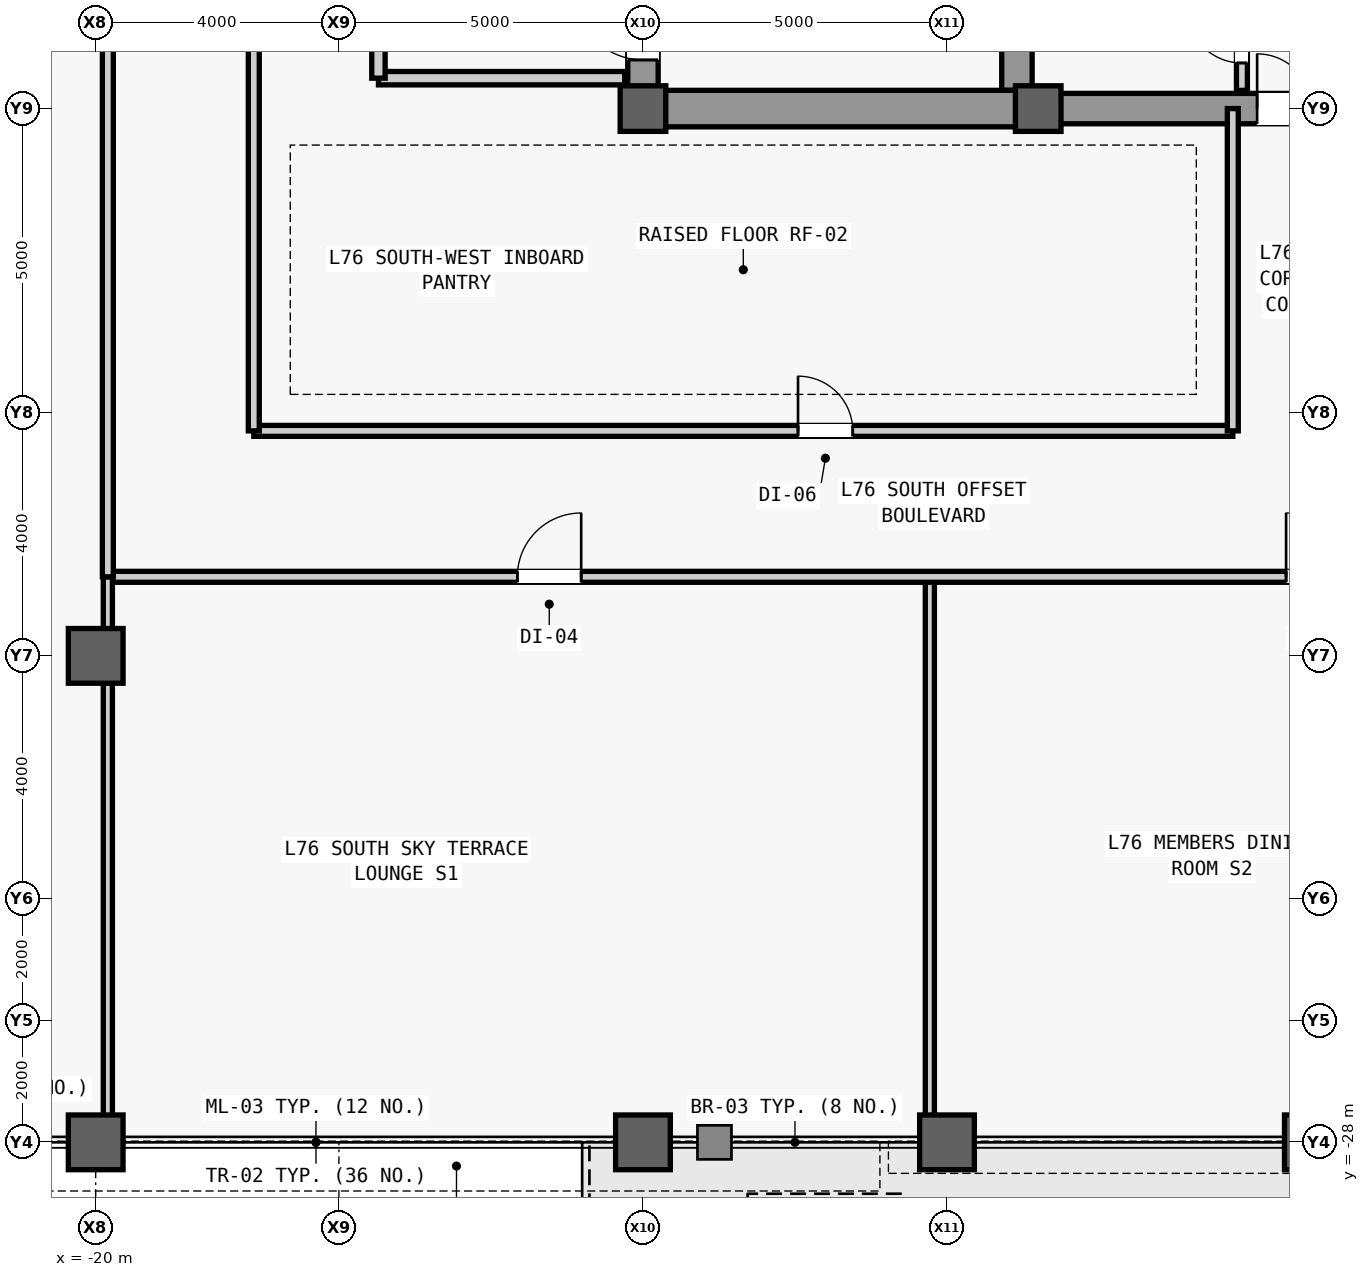
"""IFC4 building model, lengths in metres.
Left out: names, types, materials, properties, quantities, classifications, styles, units other than length and angle.
Written with IfcOpenShell. Run it as: python <this file> out.ifc"""

import sys

from ifc_helpers import new_model, si_unit, direction, frame, frame_2d, origin, origin_2d, place, context, subcontext, project, spatial, rectangle, hollow_rectangle, extrude, source, transform, mapped, element, fill, save


model = new_model("IFC4")
c1 = context("Model", 3, precision=1e-05, world=origin(), true_north=direction((0.0, 1.0)))
c2 = subcontext(c1, "Body", "Model", "MODEL_VIEW")
j1 = project(units=[si_unit("LENGTHUNIT", "METRE"), si_unit("PLANEANGLEUNIT", "RADIAN")], contexts=[c1])
p1 = place(None, origin())
s1 = spatial("IfcSite", under=j1, at=p1, CompositionType="ELEMENT")
p2 = place(p1, origin())
s2 = spatial("IfcBuilding", under=s1, at=p2, CompositionType="ELEMENT")
p3 = place(p2, frame((0.0, 0.0, 321.5)))
s3 = spatial("IfcBuildingStorey", under=s2, at=p3, CompositionType="ELEMENT", Elevation=321.5)
m1 = source(origin(), c2, "Body", "SweptSolid", [
    extrude(rectangle(XDim=22.0, YDim=0.5, at=frame_2d((11.0, 0.0))), origin(), (0.0, 0.0, 1.0), 4.54),
])
p4 = place(p3, frame((-11.0, -11.0, 0.0), z_axis=(0.0, 0.0, 1.0), x_axis=(0.0, 1.0, 0.0)))
e1 = element("IfcWall", 1, at=p4, inside=s3, PredefinedType="SHEAR", context=c2, shape_type="MappedRepresentation", body=[
    mapped(m1, transform((0.0, 0.0, 0.0), scale=1.0)),
])
m2 = source(origin(), c2, "Body", "SweptSolid", [
    extrude(rectangle(XDim=1.1, YDim=2.2, at=frame_2d((0.55, 1.1))), frame((0.0, 0.26, 0.0), z_axis=(0.0, -1.0, 0.0), x_axis=(1.0, 0.0, 0.0)), (0.0, 0.0, 1.0), 0.52),
])
p5 = place(p4, frame((0.8, 0.0, 0.0)))
e2 = element("IfcOpeningElement", 2, at=p5, cuts=e1, PredefinedType="OPENING", context=c2, shape_type="MappedRepresentation", body=[
    mapped(m2, transform((0.0, 0.0, 0.0), scale=1.0)),
])
p6 = place(p4, frame((12.5, 0.0, 0.0)))
e3 = element("IfcOpeningElement", 3, at=p6, cuts=e1, PredefinedType="OPENING", context=c2, shape_type="MappedRepresentation", body=[
    mapped(m2, transform((0.0, 0.0, 0.0), scale=1.0)),
])
m3 = source(origin(), c2, "Body", "SweptSolid", [
    extrude(rectangle(XDim=0.9, YDim=2.15, at=frame_2d((0.45, 1.075))), frame((0.0, 0.26, 0.0), z_axis=(0.0, -1.0, 0.0), x_axis=(1.0, 0.0, 0.0)), (0.0, 0.0, 1.0), 0.52),
])
p7 = place(p4, frame((6.2, 0.0, 0.0)))
e4 = element("IfcOpeningElement", 4, at=p7, cuts=e1, PredefinedType="OPENING", context=c2, shape_type="MappedRepresentation", body=[
    mapped(m3, transform((0.0, 0.0, 0.0), scale=1.0)),
])
p8 = place(p4, frame((8.525, 0.0, 0.0)))
e5 = element("IfcOpeningElement", 5, at=p8, cuts=e1, PredefinedType="OPENING", context=c2, shape_type="MappedRepresentation", body=[
    mapped(m3, transform((0.0, 0.0, 0.0), scale=1.0)),
])
m4 = source(origin(), c2, "Body", "SweptSolid", [
    extrude(rectangle(XDim=1.2, YDim=2.3, at=frame_2d((0.6, 1.15))), frame((0.0, 0.26, 0.0), z_axis=(0.0, -1.0, 0.0), x_axis=(1.0, 0.0, 0.0)), (0.0, 0.0, 1.0), 0.52),
])
p9 = place(p4, frame((14.6, 0.0, 0.0)))
e6 = element("IfcOpeningElement", 6, at=p9, cuts=e1, PredefinedType="OPENING", context=c2, shape_type="MappedRepresentation", body=[
    mapped(m4, transform((0.0, 0.0, 0.0), scale=1.0)),
])
p10 = place(p4, frame((18.2, 0.0, 0.0)))
e7 = element("IfcOpeningElement", 7, at=p10, cuts=e1, PredefinedType="OPENING", context=c2, shape_type="MappedRepresentation", body=[
    mapped(m4, transform((0.0, 0.0, 0.0), scale=1.0)),
])
m5 = source(origin(), c2, "Body", "SweptSolid", [
    extrude(rectangle(XDim=1.3, YDim=2.3, at=frame_2d((0.65, 1.15))), frame((0.0, 0.26, 0.0), z_axis=(0.0, -1.0, 0.0), x_axis=(1.0, 0.0, 0.0)), (0.0, 0.0, 1.0), 0.52),
])
p11 = place(p4, frame((2.7, 0.0, 0.0)))
e8 = element("IfcOpeningElement", 8, at=p11, cuts=e1, PredefinedType="OPENING", context=c2, shape_type="MappedRepresentation", body=[
    mapped(m5, transform((0.0, 0.0, 0.0), scale=1.0)),
])
m6 = source(origin(), c2, "Body", "SweptSolid", [
    extrude(rectangle(XDim=21.4, YDim=0.5, at=frame_2d((10.7, 0.0))), origin(), (0.0, 0.0, 1.0), 4.54),
])
p12 = place(p3, frame((-4.85, -10.7, 0.0), z_axis=(0.0, 0.0, 1.0), x_axis=(0.0, 1.0, 0.0)))
e9 = element("IfcWall", 9, at=p12, inside=s3, PredefinedType="SHEAR", context=c2, shape_type="MappedRepresentation", body=[
    mapped(m6, transform((0.0, 0.0, 0.0), scale=1.0)),
])
m7 = source(origin(), c2, "Body", "SweptSolid", [
    extrude(rectangle(XDim=5.9, YDim=0.6, at=frame_2d((2.95, 0.0))), origin(), (0.0, 0.0, 1.0), 4.54),
])
p13 = place(p3, frame((-10.75, -11.0, 0.0), z_axis=(0.0, 0.0, 1.0), x_axis=(1.0, 0.0, 0.0)))
e10 = element("IfcWall", 10, at=p13, inside=s3, PredefinedType="SHEAR", context=c2, shape_type="MappedRepresentation", body=[
    mapped(m7, transform((0.0, 0.0, 0.0), scale=1.0)),
])
m8 = source(origin(), c2, "Body", "SweptSolid", [
    extrude(rectangle(XDim=9.2, YDim=0.5, at=frame_2d((4.6, 0.0))), origin(), (0.0, 0.0, 1.0), 4.54),
])
p14 = place(p3, frame((-4.6, -11.0, 0.0), z_axis=(0.0, 0.0, 1.0), x_axis=(1.0, 0.0, 0.0)))
e11 = element("IfcWall", 11, at=p14, inside=s3, PredefinedType="SHEAR", context=c2, shape_type="MappedRepresentation", body=[
    mapped(m8, transform((0.0, 0.0, 0.0), scale=1.0)),
])
m9 = source(origin(), c2, "Body", "SweptSolid", [
    extrude(rectangle(XDim=1.8, YDim=2.25, at=frame_2d((0.9, 1.125))), frame((0.0, 0.26, 0.0), z_axis=(0.0, -1.0, 0.0), x_axis=(1.0, 0.0, 0.0)), (0.0, 0.0, 1.0), 0.52),
])
p15 = place(p14, frame((3.7, 0.0, 0.0)))
e12 = element("IfcOpeningElement", 12, at=p15, cuts=e11, PredefinedType="OPENING", context=c2, shape_type="MappedRepresentation", body=[
    mapped(m9, transform((0.0, 0.0, 0.0), scale=1.0)),
])
m10 = source(origin(), c2, "Body", "SweptSolid", [
    extrude(hollow_rectangle(XDim=0.9, YDim=0.9, WallThickness=0.05, at=origin_2d()), origin(), (0.0, 0.0, 1.0), 4.8),
])
for number, where, z_axis, x_axis in (
    (13, (-20.0, -28.0, 0.0), (0.0, 0.0, 1.0), (1.0, 0.0, 0.0)),
    (14, (-20.0, -20.0, 0.0), (0.0, 0.0, 1.0), (1.0, 0.0, 0.0)),
    (15, (-11.0, -28.0, 0.0), (0.0, 0.0, 1.0), (1.0, 0.0, 0.0)),
):
    element("IfcColumn", number, at=place(p3, frame(where, z_axis=z_axis, x_axis=x_axis)), inside=s3, PredefinedType="COLUMN", context=c2, shape_type="MappedRepresentation", body=[
        mapped(m10, transform((0.0, 0.0, 0.0), scale=1.0)),
    ])
m11 = source(origin(), c2, "Body", "SweptSolid", [
    extrude(rectangle(XDim=0.75, YDim=0.75, at=origin_2d()), origin(), (0.0, 0.0, 1.0), 4.8),
])
p16 = place(p3, frame((-11.0, -11.0, 0.0), z_axis=(0.0, 0.0, 1.0), x_axis=(1.0, 0.0, 0.0)))
e16 = element("IfcColumn", 16, at=p16, inside=s3, PredefinedType="COLUMN", context=c2, shape_type="MappedRepresentation", body=[
    mapped(m11, transform((0.0, 0.0, 0.0), scale=1.0)),
])
p17 = place(p3, frame((-6.0, -28.0, 0.0), z_axis=(0.0, 0.0, 1.0), x_axis=(1.0, 0.0, 0.0)))
e17 = element("IfcColumn", 17, at=p17, inside=s3, PredefinedType="COLUMN", context=c2, shape_type="MappedRepresentation", body=[
    mapped(m10, transform((0.0, 0.0, 0.0), scale=1.0)),
])
p18 = place(p3, frame((-4.5, -11.0, 0.0), z_axis=(0.0, 0.0, 1.0), x_axis=(1.0, 0.0, 0.0)))
e18 = element("IfcColumn", 18, at=p18, inside=s3, PredefinedType="COLUMN", context=c2, shape_type="MappedRepresentation", body=[
    mapped(m11, transform((0.0, 0.0, 0.0), scale=1.0)),
])
p19 = place(p3, frame((0.0, -28.0, 0.0), z_axis=(0.0, 0.0, 1.0), x_axis=(1.0, 0.0, 0.0)))
e19 = element("IfcColumn", 19, at=p19, inside=s3, PredefinedType="COLUMN", context=c2, shape_type="MappedRepresentation", body=[
    mapped(m10, transform((0.0, 0.0, 0.0), scale=1.0)),
])
m12 = source(origin(), c2, "Body", "SweptSolid", [
    extrude(rectangle(XDim=4.05, YDim=0.22, at=frame_2d((2.025, 0.0))), origin(), (0.0, 0.0, 1.0), 4.54),
])
p20 = place(p3, frame((-15.35, -10.5, 0.0), z_axis=(0.0, 0.0, 1.0), x_axis=(1.0, 0.0, 0.0)))
e20 = element("IfcWall", 20, at=p20, inside=s3, PredefinedType="PARTITIONING", context=c2, shape_type="MappedRepresentation", body=[
    mapped(m12, transform((0.0, 0.0, 0.0), scale=1.0)),
])
m13 = source(origin(), c2, "Body", "SweptSolid", [
    extrude(rectangle(XDim=4.4, YDim=0.22, at=frame_2d((2.2, 0.0))), origin(), (0.0, 0.0, 1.0), 4.54),
])
p21 = place(p3, frame((-15.35, -10.5, 0.0), z_axis=(0.0, 0.0, 1.0), x_axis=(0.0, 1.0, 0.0)))
e21 = element("IfcWall", 21, at=p21, inside=s3, PredefinedType="PARTITIONING", context=c2, shape_type="MappedRepresentation", body=[
    mapped(m13, transform((0.0, 0.0, 0.0), scale=1.0)),
])
m14 = source(origin(), c2, "Body", "SweptSolid", [
    extrude(rectangle(XDim=1.2, YDim=2.2, at=frame_2d((0.6, 1.1))), frame((0.0, 0.12, 0.0), z_axis=(0.0, -1.0, 0.0), x_axis=(1.0, 0.0, 0.0)), (0.0, 0.0, 1.0), 0.24),
])
p22 = place(p21, frame((1.6, 0.0, 0.0)))
e22 = element("IfcOpeningElement", 22, at=p22, cuts=e21, PredefinedType="OPENING", context=c2, shape_type="MappedRepresentation", body=[
    mapped(m14, transform((0.0, 0.0, 0.0), scale=1.0)),
])
m15 = source(origin(), c2, "Body", "SweptSolid", [
    extrude(rectangle(XDim=5.4, YDim=0.18, at=frame_2d((2.7, 0.0))), origin(), (0.0, 0.0, 1.0), 4.54),
])
p23 = place(p3, frame((-1.15, -10.7, 0.0), z_axis=(0.0, 0.0, 1.0), x_axis=(0.0, 1.0, 0.0)))
e23 = element("IfcWall", 23, at=p23, inside=s3, PredefinedType="PARTITIONING", context=c2, shape_type="MappedRepresentation", body=[
    mapped(m15, transform((0.0, 0.0, 0.0), scale=1.0)),
])
m16 = source(origin(), c2, "Body", "SweptSolid", [
    extrude(rectangle(XDim=0.9, YDim=2.15, at=frame_2d((0.45, 1.075))), frame((0.0, 0.1, 0.0), z_axis=(0.0, -1.0, 0.0), x_axis=(1.0, 0.0, 0.0)), (0.0, 0.0, 1.0), 0.2),
])
p24 = place(p23, frame((0.45, 0.0, 0.0)))
e24 = element("IfcOpeningElement", 24, at=p24, cuts=e23, PredefinedType="OPENING", context=c2, shape_type="MappedRepresentation", body=[
    mapped(m16, transform((0.0, 0.0, 0.0), scale=1.0)),
])
p25 = place(p23, frame((2.25, 0.0, 0.0)))
e25 = element("IfcOpeningElement", 25, at=p25, cuts=e23, PredefinedType="OPENING", context=c2, shape_type="MappedRepresentation", body=[
    mapped(m16, transform((0.0, 0.0, 0.0), scale=1.0)),
])
p26 = place(p23, frame((4.05, 0.0, 0.0)))
e26 = element("IfcOpeningElement", 26, at=p26, cuts=e23, PredefinedType="OPENING", context=c2, shape_type="MappedRepresentation", body=[
    mapped(m16, transform((0.0, 0.0, 0.0), scale=1.0)),
])
m17 = source(origin(), c2, "Body", "SweptSolid", [
    extrude(rectangle(XDim=16.1, YDim=0.18, at=frame_2d((8.05, 0.0))), origin(), (0.0, 0.0, 1.0), 4.54),
])
p27 = place(p3, frame((-17.4, -16.3, 0.0), z_axis=(0.0, 0.0, 1.0), x_axis=(1.0, 0.0, 0.0)))
e27 = element("IfcWall", 27, at=p27, inside=s3, PredefinedType="PARTITIONING", context=c2, shape_type="MappedRepresentation", body=[
    mapped(m17, transform((0.0, 0.0, 0.0), scale=1.0)),
])
p28 = place(p27, frame((8.95, 0.0, 0.0)))
e28 = element("IfcOpeningElement", 28, at=p28, cuts=e27, PredefinedType="OPENING", context=c2, shape_type="MappedRepresentation", body=[
    mapped(m16, transform((0.0, 0.0, 0.0), scale=1.0)),
])
m18 = source(origin(), c2, "Body", "SweptSolid", [
    extrude(rectangle(XDim=6.5, YDim=0.18, at=frame_2d((3.25, 0.0))), origin(), (0.0, 0.0, 1.0), 4.54),
])
p29 = place(p3, frame((-17.4, -16.3, 0.0), z_axis=(0.0, 0.0, 1.0), x_axis=(0.0, 1.0, 0.0)))
e29 = element("IfcWall", 29, at=p29, inside=s3, PredefinedType="PARTITIONING", context=c2, shape_type="MappedRepresentation", body=[
    mapped(m18, transform((0.0, 0.0, 0.0), scale=1.0)),
])
m19 = source(origin(), c2, "Body", "SweptSolid", [
    extrude(rectangle(XDim=5.3, YDim=0.18, at=frame_2d((2.65, 0.0))), origin(), (0.0, 0.0, 1.0), 4.54),
])
p30 = place(p3, frame((-1.3, -16.3, 0.0), z_axis=(0.0, 0.0, 1.0), x_axis=(0.0, 1.0, 0.0)))
e30 = element("IfcWall", 30, at=p30, inside=s3, PredefinedType="PARTITIONING", context=c2, shape_type="MappedRepresentation", body=[
    mapped(m19, transform((0.0, 0.0, 0.0), scale=1.0)),
])
m20 = source(origin(), c2, "Body", "SweptSolid", [
    extrude(rectangle(XDim=9.3, YDim=0.15, at=frame_2d((4.65, 0.0))), origin(), (0.0, 0.0, 1.0), 2.7),
])
p31 = place(p3, frame((-6.282, -28.0, 0.0), z_axis=(0.0, 0.0, 1.0), x_axis=(0.0, 1.0, 0.0)))
e31 = element("IfcWall", 31, at=p31, inside=s3, PredefinedType="PARTITIONING", context=c2, shape_type="MappedRepresentation", body=[
    mapped(m20, transform((0.0, 0.0, 0.0), scale=1.0)),
])
m21 = source(origin(), c2, "Body", "SweptSolid", [
    extrude(rectangle(XDim=37.55, YDim=0.18, at=frame_2d((18.775, 0.0))), origin(), (0.0, 0.0, 1.0), 4.54),
])
p32 = place(p3, frame((-19.8, -18.7, 0.0), z_axis=(0.0, 0.0, 1.0), x_axis=(1.0, 0.0, 0.0)))
e32 = element("IfcWall", 32, at=p32, inside=s3, PredefinedType="PARTITIONING", context=c2, shape_type="MappedRepresentation", body=[
    mapped(m21, transform((0.0, 0.0, 0.0), scale=1.0)),
])
m22 = source(origin(), c2, "Body", "SweptSolid", [
    extrude(rectangle(XDim=1.05, YDim=2.2, at=frame_2d((0.525, 1.1))), frame((0.0, 0.1, 0.0), z_axis=(0.0, -1.0, 0.0), x_axis=(1.0, 0.0, 0.0)), (0.0, 0.0, 1.0), 0.2),
])
p33 = place(p32, frame((6.734, 0.0, 0.0)))
e33 = element("IfcOpeningElement", 33, at=p33, cuts=e32, PredefinedType="OPENING", context=c2, shape_type="MappedRepresentation", body=[
    mapped(m22, transform((0.0, 0.0, 0.0), scale=1.0)),
])
p34 = place(p32, frame((19.376, 0.0, 0.0)))
e34 = element("IfcOpeningElement", 34, at=p34, cuts=e32, PredefinedType="OPENING", context=c2, shape_type="MappedRepresentation", body=[
    mapped(m22, transform((0.0, 0.0, 0.0), scale=1.0)),
])
p35 = place(p32, frame((30.867, 0.0, 0.0)))
e35 = element("IfcOpeningElement", 35, at=p35, cuts=e32, PredefinedType="OPENING", context=c2, shape_type="MappedRepresentation", body=[
    mapped(m22, transform((0.0, 0.0, 0.0), scale=1.0)),
])
p36 = place(p3, frame((-19.8, -28.0, 0.0), z_axis=(0.0, 0.0, 1.0), x_axis=(0.0, 1.0, 0.0)))
e36 = element("IfcWall", 36, at=p36, inside=s3, PredefinedType="PARTITIONING", context=c2, shape_type="MappedRepresentation", body=[
    mapped(m20, transform((0.0, 0.0, 0.0), scale=1.0)),
])
m23 = source(origin(), c2, "Body", "SweptSolid", [
    extrude(rectangle(XDim=41.2, YDim=0.18, at=frame_2d((20.6, 0.0))), origin(), (0.0, 0.0, 1.0), 2.7),
])
p37 = place(p3, frame((-19.8, -18.7, 0.0), z_axis=(0.0, 0.0, 1.0), x_axis=(0.0, 1.0, 0.0)))
e37 = element("IfcWall", 37, at=p37, inside=s3, PredefinedType="PARTITIONING", context=c2, shape_type="MappedRepresentation", body=[
    mapped(m23, transform((0.0, 0.0, 0.0), scale=1.0)),
])
m24 = source(origin(), c2, "Body", "SweptSolid", [
    extrude(rectangle(XDim=0.95, YDim=2.15, at=frame_2d((0.475, 1.075))), frame((0.0, 0.1, 0.0), z_axis=(0.0, -1.0, 0.0), x_axis=(1.0, 0.0, 0.0)), (0.0, 0.0, 1.0), 0.2),
])
p38 = place(p37, frame((17.875, 0.0, 0.0)))
e38 = element("IfcOpeningElement", 38, at=p38, cuts=e37, PredefinedType="OPENING", context=c2, shape_type="MappedRepresentation", body=[
    mapped(m24, transform((0.0, 0.0, 0.0), scale=1.0)),
])
m25 = source(origin(), c2, "Body", "SweptSolid", [
    extrude(rectangle(XDim=1.1, YDim=2.2, at=frame_2d((0.55, 1.1))), frame((0.0, 0.025, 0.0), z_axis=(0.0, -1.0, 0.0), x_axis=(1.0, 0.0, 0.0)), (0.0, 0.0, 1.0), 0.05),
])
p39 = place(p5, origin())
e39 = element("IfcDoor", 39, at=p39, inside=s3, OperationType="SINGLE_SWING_RIGHT", PredefinedType="DOOR", context=c2, shape_type="MappedRepresentation", body=[
    mapped(m25, transform((0.0, 0.0, 0.0), scale=1.0)),
])
fill(e2, e39)
m26 = source(origin(), c2, "Body", "SweptSolid", [
    extrude(rectangle(XDim=0.9, YDim=2.15, at=frame_2d((0.45, 1.075))), frame((0.0, 0.025, 0.0), z_axis=(0.0, -1.0, 0.0), x_axis=(1.0, 0.0, 0.0)), (0.0, 0.0, 1.0), 0.05),
])
p40 = place(p24, origin())
e40 = element("IfcDoor", 40, at=p40, inside=s3, OperationType="SINGLE_SWING_RIGHT", PredefinedType="DOOR", context=c2, shape_type="MappedRepresentation", body=[
    mapped(m26, transform((0.0, 0.0, 0.0), scale=1.0)),
])
fill(e24, e40)
m27 = source(origin(), c2, "Body", "SweptSolid", [
    extrude(rectangle(XDim=1.8, YDim=2.25, at=frame_2d((0.9, 1.125))), frame((0.0, 0.025, 0.0), z_axis=(0.0, -1.0, 0.0), x_axis=(1.0, 0.0, 0.0)), (0.0, 0.0, 1.0), 0.05),
])
p41 = place(p15, origin())
e41 = element("IfcDoor", 41, at=p41, inside=s3, OperationType="SINGLE_SWING_LEFT", PredefinedType="DOOR", context=c2, shape_type="MappedRepresentation", body=[
    mapped(m27, transform((0.0, 0.0, 0.0), scale=1.0)),
])
fill(e12, e41)
p42 = place(p28, origin())
e42 = element("IfcDoor", 42, at=p42, inside=s3, OperationType="SINGLE_SWING_LEFT", PredefinedType="DOOR", context=c2, shape_type="MappedRepresentation", body=[
    mapped(m26, transform((0.0, 0.0, 0.0), scale=1.0)),
])
fill(e28, e42)
m28 = source(origin(), c2, "Body", "SweptSolid", [
    extrude(rectangle(XDim=1.05, YDim=2.2, at=frame_2d((0.525, 1.1))), frame((0.0, 0.025, 0.0), z_axis=(0.0, -1.0, 0.0), x_axis=(1.0, 0.0, 0.0)), (0.0, 0.0, 1.0), 0.05),
])
p43 = place(p33, origin())
e43 = element("IfcDoor", 43, at=p43, inside=s3, OperationType="SINGLE_SWING_RIGHT", PredefinedType="DOOR", context=c2, shape_type="MappedRepresentation", body=[
    mapped(m28, transform((0.0, 0.0, 0.0), scale=1.0)),
])
fill(e33, e43)
p44 = place(p34, origin())
e44 = element("IfcDoor", 44, at=p44, inside=s3, OperationType="SINGLE_SWING_LEFT", PredefinedType="DOOR", context=c2, shape_type="MappedRepresentation", body=[
    mapped(m28, transform((0.0, 0.0, 0.0), scale=1.0)),
])
fill(e34, e44)
save(model, sys.argv[1])
